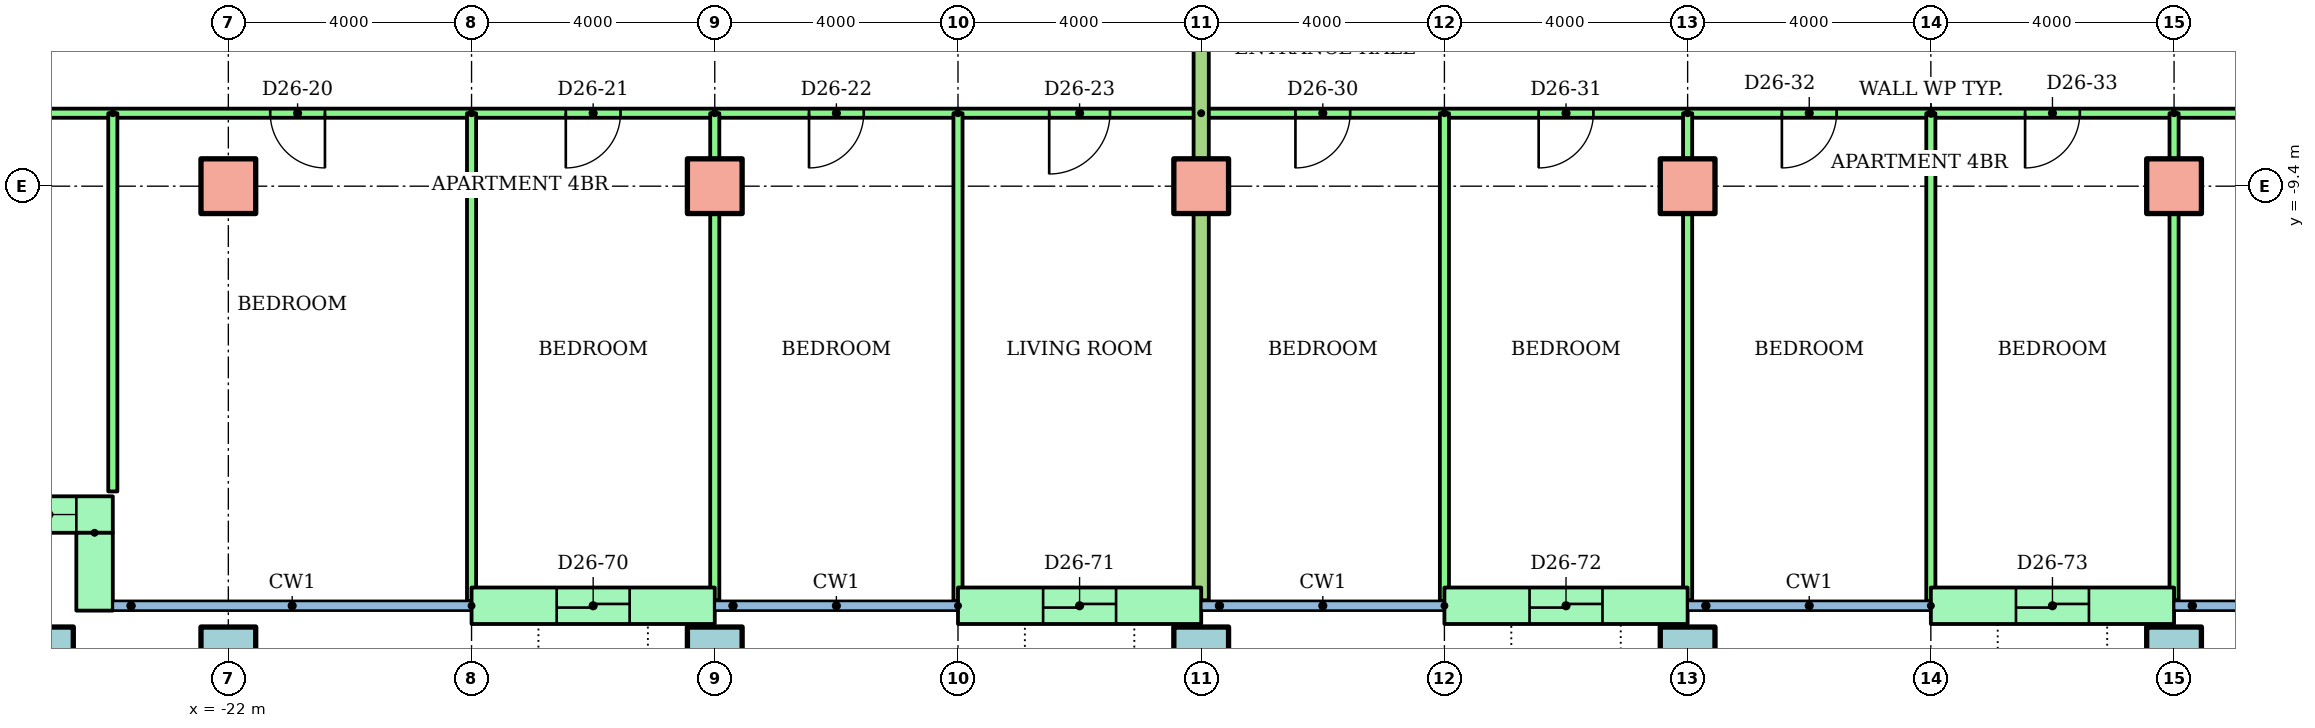
"""IFC4 building model, lengths in metres.
Left out: names, types, materials, properties, quantities, classifications, styles, units other than length and angle.
Written with IfcOpenShell. Run it as: python <this file> out.ifc"""

import sys

from ifc_helpers import new_model, si_unit, direction, frame, frame_2d, origin, origin_2d, place, context, subcontext, project, spatial, rectangle, hollow_rectangle, extrude, element, fill, save


model = new_model("IFC4")
c1 = context("Model", 3, precision=1e-05, world=origin(), true_north=direction((0.0, 1.0)))
c2 = subcontext(c1, "Body", "Model", "MODEL_VIEW")
j1 = project(units=[si_unit("LENGTHUNIT", "METRE"), si_unit("PLANEANGLEUNIT", "RADIAN")], contexts=[c1])
p1 = place(None, origin())
s1 = spatial("IfcSite", under=j1, at=p1, CompositionType="ELEMENT")
p2 = place(p1, origin())
s2 = spatial("IfcBuilding", under=s1, at=p2, CompositionType="ELEMENT")
p3 = place(p2, frame((0.0, 0.0, 99.9)))
s3 = spatial("IfcBuildingStorey", under=s2, at=p3, CompositionType="ELEMENT", Elevation=99.9)
for number, where in (
    (1, (-25.0, -17.1, 0.0)),
    (2, (-22.0, -17.1, 0.0)),
    (3, (-14.0, -17.1, 0.0)),
    (4, (-6.0, -17.1, 0.0)),
    (5, (2.0, -17.1, 0.0)),
    (6, (10.0, -17.1, 0.0)),
):
    element("IfcColumn", number, at=place(p3, frame(where)), inside=s3, PredefinedType="COLUMN", context=c2, shape_type="SweptSolid", body=[
        extrude(hollow_rectangle(XDim=0.9, YDim=0.9, WallThickness=0.045, at=origin_2d()), origin(), (0.0, 0.0, 1.0), 3.2),
    ])
for number, where in (
    (7, (-22.0, -9.4, 0.0)),
    (8, (-14.0, -9.4, 0.0)),
    (9, (-6.0, -9.4, 0.0)),
    (10, (2.0, -9.4, 0.0)),
    (11, (10.0, -9.4, 0.0)),
):
    element("IfcColumn", number, at=place(p3, frame(where)), inside=s3, PredefinedType="COLUMN", context=c2, shape_type="SweptSolid", body=[
        extrude(rectangle(XDim=0.9, YDim=0.9, at=origin_2d()), origin(), (0.0, 0.0, 1.0), 3.2),
    ])
p4 = place(p3, frame((-26.0, -14.8, 0.0)))
e12 = element("IfcWall", 12, at=p4, inside=s3, PredefinedType="STANDARD", context=c2, shape_type="SweptSolid", body=[
    extrude(rectangle(XDim=2.1, YDim=0.6, at=frame_2d((1.05, 0.0))), origin(), (0.0, 0.0, 1.0), 2.92),
])
p5 = place(p4, frame((0.6, 0.0, 0.9)))
e13 = element("IfcOpeningElement", 13, at=p5, cuts=e12, PredefinedType="OPENING", context=c2, shape_type="SweptSolid", body=[
    extrude(rectangle(XDim=0.9, YDim=1.5, at=frame_2d((0.45, 0.75))), frame((0.0, 0.31, 0.0), z_axis=(0.0, -1.0, 0.0), x_axis=(1.0, 0.0, 0.0)), (0.0, 0.0, 1.0), 0.62),
])
p6 = place(p3, frame((-24.2, -15.1, 0.0), z_axis=(0.0, 0.0, 1.0), x_axis=(0.0, -1.0, 0.0)))
e14 = element("IfcWall", 14, at=p6, inside=s3, PredefinedType="STANDARD", context=c2, shape_type="SweptSolid", body=[
    extrude(rectangle(XDim=1.28, YDim=0.6, at=frame_2d((0.64, 0.0))), origin(), (0.0, 0.0, 1.0), 2.92),
])
p7 = place(p3, frame((-18.0, -16.3, 0.0)))
e15 = element("IfcWall", 15, at=p7, inside=s3, PredefinedType="STANDARD", context=c2, shape_type="SweptSolid", body=[
    extrude(rectangle(XDim=4.0, YDim=0.6, at=frame_2d((2.0, 0.0))), origin(), (0.0, 0.0, 1.0), 2.92),
])
p8 = place(p7, frame((1.4, 0.0, 0.0)))
e16 = element("IfcOpeningElement", 16, at=p8, cuts=e15, PredefinedType="OPENING", context=c2, shape_type="SweptSolid", body=[
    extrude(rectangle(XDim=1.2, YDim=2.1, at=frame_2d((0.6, 1.05))), frame((0.0, 0.31, 0.0), z_axis=(0.0, -1.0, 0.0), x_axis=(1.0, 0.0, 0.0)), (0.0, 0.0, 1.0), 0.62),
])
p9 = place(p3, frame((-10.0, -16.3, 0.0)))
e17 = element("IfcWall", 17, at=p9, inside=s3, PredefinedType="STANDARD", context=c2, shape_type="SweptSolid", body=[
    extrude(rectangle(XDim=4.0, YDim=0.6, at=frame_2d((2.0, 0.0))), origin(), (0.0, 0.0, 1.0), 2.92),
])
p10 = place(p9, frame((1.4, 0.0, 0.0)))
e18 = element("IfcOpeningElement", 18, at=p10, cuts=e17, PredefinedType="OPENING", context=c2, shape_type="SweptSolid", body=[
    extrude(rectangle(XDim=1.2, YDim=2.1, at=frame_2d((0.6, 1.05))), frame((0.0, 0.31, 0.0), z_axis=(0.0, -1.0, 0.0), x_axis=(1.0, 0.0, 0.0)), (0.0, 0.0, 1.0), 0.62),
])
p11 = place(p3, frame((-2.0, -16.3, 0.0)))
e19 = element("IfcWall", 19, at=p11, inside=s3, PredefinedType="STANDARD", context=c2, shape_type="SweptSolid", body=[
    extrude(rectangle(XDim=4.0, YDim=0.6, at=frame_2d((2.0, 0.0))), origin(), (0.0, 0.0, 1.0), 2.92),
])
p12 = place(p11, frame((1.4, 0.0, 0.0)))
e20 = element("IfcOpeningElement", 20, at=p12, cuts=e19, PredefinedType="OPENING", context=c2, shape_type="SweptSolid", body=[
    extrude(rectangle(XDim=1.2, YDim=2.1, at=frame_2d((0.6, 1.05))), frame((0.0, 0.31, 0.0), z_axis=(0.0, -1.0, 0.0), x_axis=(1.0, 0.0, 0.0)), (0.0, 0.0, 1.0), 0.62),
])
p13 = place(p3, frame((6.0, -16.3, 0.0)))
e21 = element("IfcWall", 21, at=p13, inside=s3, PredefinedType="STANDARD", context=c2, shape_type="SweptSolid", body=[
    extrude(rectangle(XDim=4.0, YDim=0.6, at=frame_2d((2.0, 0.0))), origin(), (0.0, 0.0, 1.0), 2.92),
])
p14 = place(p13, frame((1.4, 0.0, 0.0)))
e22 = element("IfcOpeningElement", 22, at=p14, cuts=e21, PredefinedType="OPENING", context=c2, shape_type="SweptSolid", body=[
    extrude(rectangle(XDim=1.2, YDim=2.1, at=frame_2d((0.6, 1.05))), frame((0.0, 0.31, 0.0), z_axis=(0.0, -1.0, 0.0), x_axis=(1.0, 0.0, 0.0)), (0.0, 0.0, 1.0), 0.62),
])
p15 = place(p3, frame((-6.0, -8.2, 0.0), z_axis=(0.0, 0.0, 1.0), x_axis=(-1.0, 0.0, 0.0)))
e23 = element("IfcWall", 23, at=p15, inside=s3, PredefinedType="PARTITIONING", context=c2, shape_type="SweptSolid", body=[
    extrude(rectangle(XDim=22.61, YDim=0.15, at=frame_2d((11.305, 0.0))), origin(), (0.0, 0.0, 1.0), 2.4),
])
p16 = place(p15, frame((19.7, 0.0, 0.0)))
e24 = element("IfcOpeningElement", 24, at=p16, cuts=e23, PredefinedType="OPENING", context=c2, shape_type="SweptSolid", body=[
    extrude(rectangle(XDim=0.9, YDim=2.1, at=frame_2d((0.45, 1.05))), frame((0.0, 0.085, 0.0), z_axis=(0.0, -1.0, 0.0), x_axis=(1.0, 0.0, 0.0)), (0.0, 0.0, 1.0), 0.17),
])
p17 = place(p15, frame((14.411, 0.0, 0.0)))
e25 = element("IfcOpeningElement", 25, at=p17, cuts=e23, PredefinedType="OPENING", context=c2, shape_type="SweptSolid", body=[
    extrude(rectangle(XDim=0.9, YDim=2.1, at=frame_2d((0.45, 1.05))), frame((0.0, 0.085, 0.0), z_axis=(0.0, -1.0, 0.0), x_axis=(1.0, 0.0, 0.0)), (0.0, 0.0, 1.0), 0.17),
])
p18 = place(p15, frame((9.55, 0.0, 0.0)))
e26 = element("IfcOpeningElement", 26, at=p18, cuts=e23, PredefinedType="OPENING", context=c2, shape_type="SweptSolid", body=[
    extrude(rectangle(XDim=0.9, YDim=2.1, at=frame_2d((0.45, 1.05))), frame((0.0, 0.085, 0.0), z_axis=(0.0, -1.0, 0.0), x_axis=(1.0, 0.0, 0.0)), (0.0, 0.0, 1.0), 0.17),
])
p19 = place(p15, frame((5.55, 0.0, 0.0)))
e27 = element("IfcOpeningElement", 27, at=p19, cuts=e23, PredefinedType="OPENING", context=c2, shape_type="SweptSolid", body=[
    extrude(rectangle(XDim=0.9, YDim=2.1, at=frame_2d((0.45, 1.05))), frame((0.0, 0.085, 0.0), z_axis=(0.0, -1.0, 0.0), x_axis=(1.0, 0.0, 0.0)), (0.0, 0.0, 1.0), 0.17),
])
p20 = place(p15, frame((1.5, 0.0, 0.0)))
e28 = element("IfcOpeningElement", 28, at=p20, cuts=e23, PredefinedType="OPENING", context=c2, shape_type="SweptSolid", body=[
    extrude(rectangle(XDim=1.0, YDim=2.1, at=frame_2d((0.5, 1.05))), frame((0.0, 0.085, 0.0), z_axis=(0.0, -1.0, 0.0), x_axis=(1.0, 0.0, 0.0)), (0.0, 0.0, 1.0), 0.17),
])
p21 = place(p3, frame((-23.9, -8.2, 0.0), z_axis=(0.0, 0.0, 1.0), x_axis=(0.0, -1.0, 0.0)))
e29 = element("IfcWall", 29, at=p21, inside=s3, PredefinedType="PARTITIONING", context=c2, shape_type="SweptSolid", body=[
    extrude(rectangle(XDim=6.22, YDim=0.15, at=frame_2d((3.11, 0.0))), origin(), (0.0, 0.0, 1.0), 2.4),
])
p22 = place(p3, frame((-18.0, -8.2, 0.0), z_axis=(0.0, 0.0, 1.0), x_axis=(0.0, -1.0, 0.0)))
e30 = element("IfcWall", 30, at=p22, inside=s3, PredefinedType="PARTITIONING", context=c2, shape_type="SweptSolid", body=[
    extrude(rectangle(XDim=8.021, YDim=0.15, at=frame_2d((4.01, 0.0))), origin(), (0.0, 0.0, 1.0), 2.4),
])
p23 = place(p3, frame((-14.0, -8.2, 0.0), z_axis=(0.0, 0.0, 1.0), x_axis=(0.0, -1.0, 0.0)))
e31 = element("IfcWall", 31, at=p23, inside=s3, PredefinedType="PARTITIONING", context=c2, shape_type="SweptSolid", body=[
    extrude(rectangle(XDim=8.01, YDim=0.15, at=frame_2d((4.005, 0.0))), origin(), (0.0, 0.0, 1.0), 2.4),
])
p24 = place(p3, frame((-10.0, -8.2, 0.0), z_axis=(0.0, 0.0, 1.0), x_axis=(0.0, -1.0, 0.0)))
e32 = element("IfcWall", 32, at=p24, inside=s3, PredefinedType="PARTITIONING", context=c2, shape_type="SweptSolid", body=[
    extrude(rectangle(XDim=8.021, YDim=0.15, at=frame_2d((4.01, 0.0))), origin(), (0.0, 0.0, 1.0), 2.4),
])
p25 = place(p3, frame((18.0, -8.2, 0.0), z_axis=(0.0, 0.0, 1.0), x_axis=(-1.0, 0.0, 0.0)))
e33 = element("IfcWall", 33, at=p25, inside=s3, PredefinedType="PARTITIONING", context=c2, shape_type="SweptSolid", body=[
    extrude(rectangle(XDim=24.0, YDim=0.15, at=frame_2d((12.0, 0.0))), origin(), (0.0, 0.0, 1.0), 2.4),
])
p26 = place(p25, frame((21.55, 0.0, 0.0)))
e34 = element("IfcOpeningElement", 34, at=p26, cuts=e33, PredefinedType="OPENING", context=c2, shape_type="SweptSolid", body=[
    extrude(rectangle(XDim=0.9, YDim=2.1, at=frame_2d((0.45, 1.05))), frame((0.0, 0.085, 0.0), z_axis=(0.0, -1.0, 0.0), x_axis=(1.0, 0.0, 0.0)), (0.0, 0.0, 1.0), 0.17),
])
p27 = place(p25, frame((17.55, 0.0, 0.0)))
e35 = element("IfcOpeningElement", 35, at=p27, cuts=e33, PredefinedType="OPENING", context=c2, shape_type="SweptSolid", body=[
    extrude(rectangle(XDim=0.9, YDim=2.1, at=frame_2d((0.45, 1.05))), frame((0.0, 0.085, 0.0), z_axis=(0.0, -1.0, 0.0), x_axis=(1.0, 0.0, 0.0)), (0.0, 0.0, 1.0), 0.17),
])
p28 = place(p25, frame((13.55, 0.0, 0.0)))
e36 = element("IfcOpeningElement", 36, at=p28, cuts=e33, PredefinedType="OPENING", context=c2, shape_type="SweptSolid", body=[
    extrude(rectangle(XDim=0.9, YDim=2.1, at=frame_2d((0.45, 1.05))), frame((0.0, 0.085, 0.0), z_axis=(0.0, -1.0, 0.0), x_axis=(1.0, 0.0, 0.0)), (0.0, 0.0, 1.0), 0.17),
])
p29 = place(p25, frame((9.55, 0.0, 0.0)))
e37 = element("IfcOpeningElement", 37, at=p29, cuts=e33, PredefinedType="OPENING", context=c2, shape_type="SweptSolid", body=[
    extrude(rectangle(XDim=0.9, YDim=2.1, at=frame_2d((0.45, 1.05))), frame((0.0, 0.085, 0.0), z_axis=(0.0, -1.0, 0.0), x_axis=(1.0, 0.0, 0.0)), (0.0, 0.0, 1.0), 0.17),
])
p30 = place(p25, frame((3.5, 0.0, 0.0)))
e38 = element("IfcOpeningElement", 38, at=p30, cuts=e33, PredefinedType="OPENING", context=c2, shape_type="SweptSolid", body=[
    extrude(rectangle(XDim=1.0, YDim=2.1, at=frame_2d((0.5, 1.05))), frame((0.0, 0.085, 0.0), z_axis=(0.0, -1.0, 0.0), x_axis=(1.0, 0.0, 0.0)), (0.0, 0.0, 1.0), 0.17),
])
p31 = place(p3, frame((-2.0, -8.2, 0.0), z_axis=(0.0, 0.0, 1.0), x_axis=(0.0, -1.0, 0.0)))
e39 = element("IfcWall", 39, at=p31, inside=s3, PredefinedType="PARTITIONING", context=c2, shape_type="SweptSolid", body=[
    extrude(rectangle(XDim=8.021, YDim=0.15, at=frame_2d((4.01, 0.0))), origin(), (0.0, 0.0, 1.0), 2.4),
])
p32 = place(p3, frame((2.0, -8.2, 0.0), z_axis=(0.0, 0.0, 1.0), x_axis=(0.0, -1.0, 0.0)))
e40 = element("IfcWall", 40, at=p32, inside=s3, PredefinedType="PARTITIONING", context=c2, shape_type="SweptSolid", body=[
    extrude(rectangle(XDim=8.01, YDim=0.15, at=frame_2d((4.005, 0.0))), origin(), (0.0, 0.0, 1.0), 2.4),
])
p33 = place(p3, frame((6.0, -8.2, 0.0), z_axis=(0.0, 0.0, 1.0), x_axis=(0.0, -1.0, 0.0)))
e41 = element("IfcWall", 41, at=p33, inside=s3, PredefinedType="PARTITIONING", context=c2, shape_type="SweptSolid", body=[
    extrude(rectangle(XDim=8.021, YDim=0.15, at=frame_2d((4.01, 0.0))), origin(), (0.0, 0.0, 1.0), 2.4),
])
p34 = place(p3, frame((10.0, -8.2, 0.0), z_axis=(0.0, 0.0, 1.0), x_axis=(0.0, -1.0, 0.0)))
e42 = element("IfcWall", 42, at=p34, inside=s3, PredefinedType="PARTITIONING", context=c2, shape_type="SweptSolid", body=[
    extrude(rectangle(XDim=8.01, YDim=0.15, at=frame_2d((4.005, 0.0))), origin(), (0.0, 0.0, 1.0), 2.4),
])
p35 = place(p3, frame((-6.0, -1.4, 0.0), z_axis=(0.0, 0.0, 1.0), x_axis=(0.0, -1.0, 0.0)))
e43 = element("IfcWall", 43, at=p35, inside=s3, PredefinedType="PARTITIONING", context=c2, shape_type="SweptSolid", body=[
    extrude(rectangle(XDim=14.81, YDim=0.25, at=frame_2d((7.405, 0.0))), origin(), (0.0, 0.0, 1.0), 2.4),
])
p36 = place(p5, origin())
e44 = element("IfcWindow", 44, at=p36, inside=s3, PartitioningType="SINGLE_PANEL", PredefinedType="WINDOW", context=c2, shape_type="SweptSolid", body=[
    extrude(rectangle(XDim=0.9, YDim=1.5, at=frame_2d((0.45, 0.75))), frame((0.0, 0.03, 0.0), z_axis=(0.0, -1.0, 0.0), x_axis=(1.0, 0.0, 0.0)), (0.0, 0.0, 1.0), 0.06),
])
fill(e13, e44)
p37 = place(p17, origin())
e45 = element("IfcDoor", 45, at=p37, inside=s3, OperationType="SINGLE_SWING_LEFT", PredefinedType="DOOR", context=c2, shape_type="SweptSolid", body=[
    extrude(rectangle(XDim=0.9, YDim=2.1, at=frame_2d((0.45, 1.05))), frame((0.0, 0.025, 0.0), z_axis=(0.0, -1.0, 0.0), x_axis=(1.0, 0.0, 0.0)), (0.0, 0.0, 1.0), 0.05),
])
fill(e25, e45)
p38 = place(p18, origin())
e46 = element("IfcDoor", 46, at=p38, inside=s3, OperationType="SINGLE_SWING_RIGHT", PredefinedType="DOOR", context=c2, shape_type="SweptSolid", body=[
    extrude(rectangle(XDim=0.9, YDim=2.1, at=frame_2d((0.45, 1.05))), frame((0.0, 0.025, 0.0), z_axis=(0.0, -1.0, 0.0), x_axis=(1.0, 0.0, 0.0)), (0.0, 0.0, 1.0), 0.05),
])
fill(e26, e46)
p39 = place(p19, origin())
e47 = element("IfcDoor", 47, at=p39, inside=s3, OperationType="SINGLE_SWING_RIGHT", PredefinedType="DOOR", context=c2, shape_type="SweptSolid", body=[
    extrude(rectangle(XDim=0.9, YDim=2.1, at=frame_2d((0.45, 1.05))), frame((0.0, 0.025, 0.0), z_axis=(0.0, -1.0, 0.0), x_axis=(1.0, 0.0, 0.0)), (0.0, 0.0, 1.0), 0.05),
])
fill(e27, e47)
p40 = place(p20, origin())
e48 = element("IfcDoor", 48, at=p40, inside=s3, OperationType="SINGLE_SWING_RIGHT", PredefinedType="DOOR", context=c2, shape_type="SweptSolid", body=[
    extrude(rectangle(XDim=1.0, YDim=2.1, at=frame_2d((0.5, 1.05))), frame((0.0, 0.025, 0.0), z_axis=(0.0, -1.0, 0.0), x_axis=(1.0, 0.0, 0.0)), (0.0, 0.0, 1.0), 0.05),
])
fill(e28, e48)
p41 = place(p26, origin())
e49 = element("IfcDoor", 49, at=p41, inside=s3, OperationType="SINGLE_SWING_RIGHT", PredefinedType="DOOR", context=c2, shape_type="SweptSolid", body=[
    extrude(rectangle(XDim=0.9, YDim=2.1, at=frame_2d((0.45, 1.05))), frame((0.0, 0.025, 0.0), z_axis=(0.0, -1.0, 0.0), x_axis=(1.0, 0.0, 0.0)), (0.0, 0.0, 1.0), 0.05),
])
fill(e34, e49)
p42 = place(p27, origin())
e50 = element("IfcDoor", 50, at=p42, inside=s3, OperationType="SINGLE_SWING_RIGHT", PredefinedType="DOOR", context=c2, shape_type="SweptSolid", body=[
    extrude(rectangle(XDim=0.9, YDim=2.1, at=frame_2d((0.45, 1.05))), frame((0.0, 0.025, 0.0), z_axis=(0.0, -1.0, 0.0), x_axis=(1.0, 0.0, 0.0)), (0.0, 0.0, 1.0), 0.05),
])
fill(e35, e50)
p43 = place(p28, origin())
e51 = element("IfcDoor", 51, at=p43, inside=s3, OperationType="SINGLE_SWING_RIGHT", PredefinedType="DOOR", context=c2, shape_type="SweptSolid", body=[
    extrude(rectangle(XDim=0.9, YDim=2.1, at=frame_2d((0.45, 1.05))), frame((0.0, 0.025, 0.0), z_axis=(0.0, -1.0, 0.0), x_axis=(1.0, 0.0, 0.0)), (0.0, 0.0, 1.0), 0.05),
])
fill(e36, e51)
p44 = place(p29, origin())
e52 = element("IfcDoor", 52, at=p44, inside=s3, OperationType="SINGLE_SWING_RIGHT", PredefinedType="DOOR", context=c2, shape_type="SweptSolid", body=[
    extrude(rectangle(XDim=0.9, YDim=2.1, at=frame_2d((0.45, 1.05))), frame((0.0, 0.025, 0.0), z_axis=(0.0, -1.0, 0.0), x_axis=(1.0, 0.0, 0.0)), (0.0, 0.0, 1.0), 0.05),
])
fill(e37, e52)
p45 = place(p8, origin())
e53 = element("IfcDoor", 53, at=p45, inside=s3, OperationType="SLIDING_TO_LEFT", PredefinedType="DOOR", context=c2, shape_type="SweptSolid", body=[
    extrude(rectangle(XDim=1.2, YDim=2.1, at=frame_2d((0.6, 1.05))), frame((0.0, 0.025, 0.0), z_axis=(0.0, -1.0, 0.0), x_axis=(1.0, 0.0, 0.0)), (0.0, 0.0, 1.0), 0.05),
])
fill(e16, e53)
p46 = place(p10, origin())
e54 = element("IfcDoor", 54, at=p46, inside=s3, OperationType="SLIDING_TO_LEFT", PredefinedType="DOOR", context=c2, shape_type="SweptSolid", body=[
    extrude(rectangle(XDim=1.2, YDim=2.1, at=frame_2d((0.6, 1.05))), frame((0.0, 0.025, 0.0), z_axis=(0.0, -1.0, 0.0), x_axis=(1.0, 0.0, 0.0)), (0.0, 0.0, 1.0), 0.05),
])
fill(e18, e54)
p47 = place(p12, origin())
e55 = element("IfcDoor", 55, at=p47, inside=s3, OperationType="SLIDING_TO_LEFT", PredefinedType="DOOR", context=c2, shape_type="SweptSolid", body=[
    extrude(rectangle(XDim=1.2, YDim=2.1, at=frame_2d((0.6, 1.05))), frame((0.0, 0.025, 0.0), z_axis=(0.0, -1.0, 0.0), x_axis=(1.0, 0.0, 0.0)), (0.0, 0.0, 1.0), 0.05),
])
fill(e20, e55)
p48 = place(p14, origin())
e56 = element("IfcDoor", 56, at=p48, inside=s3, OperationType="SLIDING_TO_LEFT", PredefinedType="DOOR", context=c2, shape_type="SweptSolid", body=[
    extrude(rectangle(XDim=1.2, YDim=2.1, at=frame_2d((0.6, 1.05))), frame((0.0, 0.025, 0.0), z_axis=(0.0, -1.0, 0.0), x_axis=(1.0, 0.0, 0.0)), (0.0, 0.0, 1.0), 0.05),
])
fill(e22, e56)
save(model, sys.argv[1])
